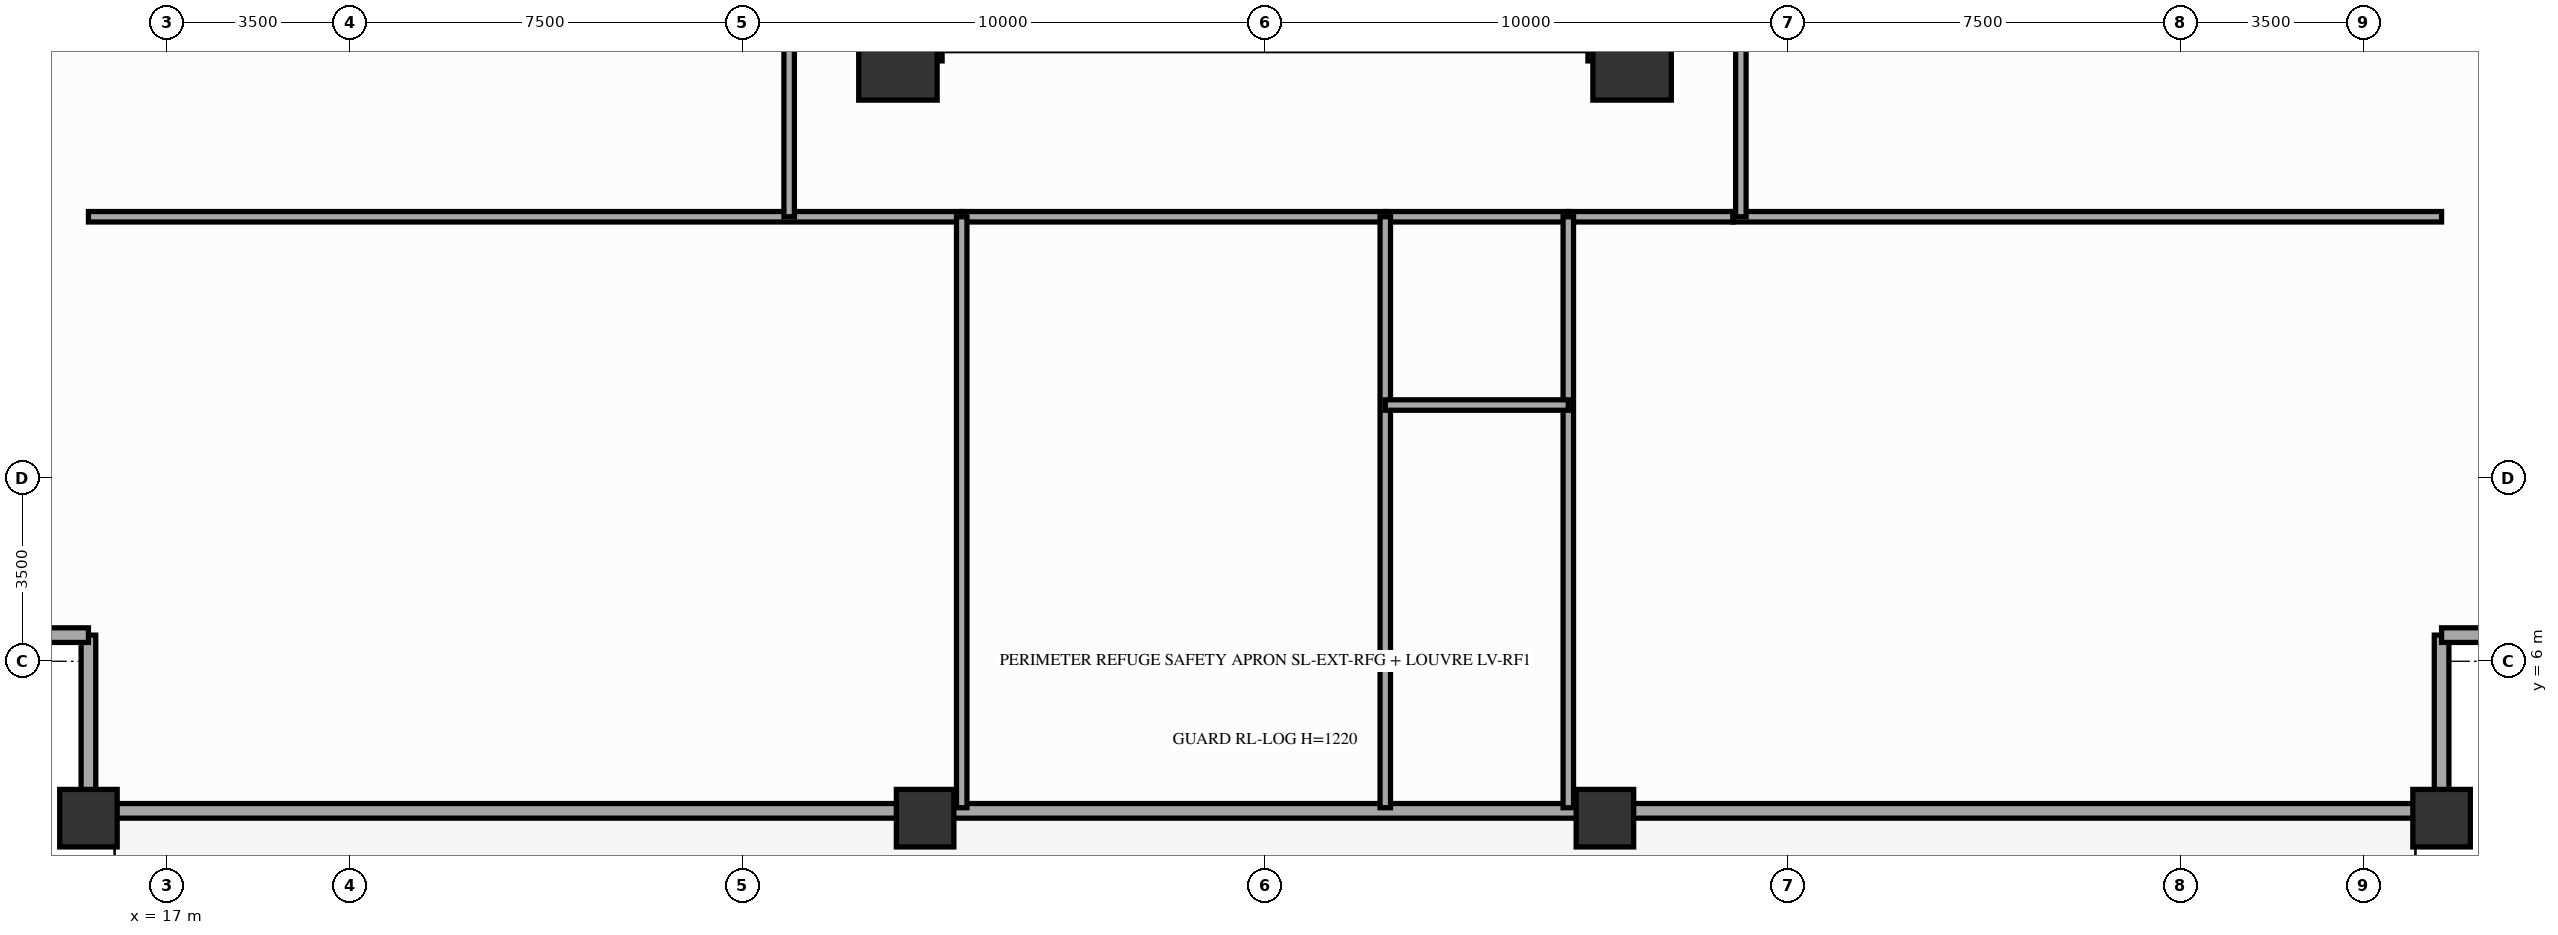
"""IFC4 building model, lengths in metres.
Left out: names, types, materials, properties, quantities, classifications, styles, units other than length and angle.
Written with IfcOpenShell. Run it as: python <this file> out.ifc"""

import sys

from ifc_helpers import new_model, si_unit, direction, frame, frame_2d, origin, origin_2d, place, context, subcontext, project, spatial, rectangle, extrude, source, transform, mapped, element, fill, save


model = new_model("IFC4")
c1 = context("Model", 3, precision=1e-05, world=origin(), true_north=direction((0.0, 1.0)))
c2 = subcontext(c1, "Body", "Model", "MODEL_VIEW")
j1 = project(units=[si_unit("LENGTHUNIT", "METRE"), si_unit("PLANEANGLEUNIT", "RADIAN")], contexts=[c1])
p1 = place(None, origin())
s1 = spatial("IfcSite", under=j1, at=p1, CompositionType="ELEMENT")
p2 = place(p1, origin())
s2 = spatial("IfcBuilding", under=s1, at=p2, CompositionType="ELEMENT")
p3 = place(p2, frame((0.0, 0.0, 70.4)))
s3 = spatial("IfcBuildingStorey", under=s2, at=p3, CompositionType="ELEMENT", Elevation=70.4)
p4 = place(p3, frame((31.5, 17.48, 0.0), z_axis=(0.0, 0.0, 1.0), x_axis=(0.0, 1.0, 0.0)))
e1 = element("IfcWall", 1, at=p4, inside=s3, PredefinedType="SHEAR", context=c2, shape_type="SweptSolid", body=[
    extrude(rectangle(XDim=19.04, YDim=0.65, at=frame_2d((9.52, 0.0))), origin(), (0.0, 0.0, 1.0), 3.95),
])
p5 = place(p4, frame((6.32, 0.0, 0.0)))
e2 = element("IfcOpeningElement", 2, at=p5, cuts=e1, PredefinedType="OPENING", context=c2, shape_type="SweptSolid", body=[
    extrude(rectangle(XDim=1.1, YDim=2.15, at=frame_2d((0.55, 1.075))), frame((0.0, 0.337, 0.0), z_axis=(0.0, -1.0, 0.0), x_axis=(1.0, 0.0, 0.0)), (0.0, 0.0, 1.0), 0.674),
])
p6 = place(p3, frame((44.5, 17.48, 0.0), z_axis=(0.0, 0.0, 1.0), x_axis=(0.0, 1.0, 0.0)))
e3 = element("IfcWall", 3, at=p6, inside=s3, PredefinedType="SHEAR", context=c2, shape_type="SweptSolid", body=[
    extrude(rectangle(XDim=19.04, YDim=0.65, at=frame_2d((9.52, 0.0))), origin(), (0.0, 0.0, 1.0), 3.95),
])
p7 = place(p6, frame((12.67, 0.0, 0.0), z_axis=(0.0, 0.0, 1.0), x_axis=(-1.0, 0.0, 0.0)))
e4 = element("IfcOpeningElement", 4, at=p7, cuts=e3, PredefinedType="OPENING", context=c2, shape_type="SweptSolid", body=[
    extrude(rectangle(XDim=1.1, YDim=2.15, at=frame_2d((0.55, 1.075))), frame((0.0, 0.337, 0.0), z_axis=(0.0, -1.0, 0.0), x_axis=(1.0, 0.0, 0.0)), (0.0, 0.0, 1.0), 0.674),
])
m1 = source(origin(), c2, "Body", "SweptSolid", [
    extrude(rectangle(XDim=1.5, YDim=1.5, at=origin_2d()), origin(), (0.0, 0.0, 1.0), 3.95),
])
for number, where, z_axis, x_axis in (
    (5, (30.98, 17.48, 0.0), (0.0, 0.0, 1.0), (1.0, 0.0, 0.0)),
    (6, (45.02, 17.48, 0.0), (0.0, 0.0, 1.0), (1.0, 0.0, 0.0)),
):
    element("IfcColumn", number, at=place(p3, frame(where, z_axis=z_axis, x_axis=x_axis)), inside=s3, PredefinedType="COLUMN", context=c2, shape_type="MappedRepresentation", body=[
        mapped(m1, transform((0.0, 0.0, 0.0), scale=1.0)),
    ])
m2 = source(origin(), c2, "Body", "SweptSolid", [
    extrude(rectangle(XDim=1.1, YDim=1.1, at=origin_2d()), origin(), (0.0, 0.0, 1.0), 3.95),
])
for number, where, z_axis, x_axis in (
    (7, (15.5, 3.0, 0.0), (0.0, 0.0, 1.0), (1.0, 0.0, 0.0)),
    (8, (31.5, 3.0, 0.0), (0.0, 0.0, 1.0), (1.0, 0.0, 0.0)),
    (9, (44.5, 3.0, 0.0), (0.0, 0.0, 1.0), (1.0, 0.0, 0.0)),
    (10, (60.5, 3.0, 0.0), (0.0, 0.0, 1.0), (1.0, 0.0, 0.0)),
):
    element("IfcColumn", number, at=place(p3, frame(where, z_axis=z_axis, x_axis=x_axis)), inside=s3, PredefinedType="COLUMN", context=c2, shape_type="MappedRepresentation", body=[
        mapped(m2, transform((0.0, 0.0, 0.0), scale=1.0)),
    ])
p8 = place(p3, frame((15.5, 3.14, 0.0), z_axis=(0.0, 0.0, 1.0), x_axis=(1.0, 0.0, 0.0)))
e11 = element("IfcWall", 11, at=p8, inside=s3, PredefinedType="SOLIDWALL", context=c2, shape_type="SweptSolid", body=[
    extrude(rectangle(XDim=45.0, YDim=0.28, at=frame_2d((22.5, 0.0))), origin(), (0.0, 0.0, 1.0), 2.29),
])
p9 = place(p8, frame((18.7, 0.0, 0.45)))
e12 = element("IfcOpeningElement", 12, at=p9, cuts=e11, PredefinedType="OPENING", context=c2, shape_type="SweptSolid", body=[
    extrude(rectangle(XDim=1.2, YDim=0.9, at=frame_2d((0.6, 0.45))), frame((0.0, 0.152, 0.0), z_axis=(0.0, -1.0, 0.0), x_axis=(1.0, 0.0, 0.0)), (0.0, 0.0, 1.0), 0.304),
])
p10 = place(p8, frame((25.7, 0.0, 0.45)))
e13 = element("IfcOpeningElement", 13, at=p10, cuts=e11, PredefinedType="OPENING", context=c2, shape_type="SweptSolid", body=[
    extrude(rectangle(XDim=1.2, YDim=0.9, at=frame_2d((0.6, 0.45))), frame((0.0, 0.152, 0.0), z_axis=(0.0, -1.0, 0.0), x_axis=(1.0, 0.0, 0.0)), (0.0, 0.0, 1.0), 0.304),
])
for number, where, z_axis, x_axis in (
    (14, (15.5, 3.0, 0.0), (0.0, 0.0, 1.0), (0.0, 1.0, 0.0)),
    (15, (12.0, 6.5, 0.0), (0.0, 0.0, 1.0), (1.0, 0.0, 0.0)),
    (16, (60.5, 3.0, 0.0), (0.0, 0.0, 1.0), (0.0, 1.0, 0.0)),
    (17, (60.5, 6.5, 0.0), (0.0, 0.0, 1.0), (1.0, 0.0, 0.0)),
):
    element("IfcWall", number, at=place(p3, frame(where, z_axis=z_axis, x_axis=x_axis)), inside=s3, PredefinedType="SOLIDWALL", context=c2, shape_type="SweptSolid", body=[
        extrude(rectangle(XDim=3.5, YDim=0.28, at=frame_2d((1.75, 0.0))), origin(), (0.0, 0.0, 1.0), 2.29),
    ])
p11 = place(p3, frame((15.5, 14.5, 0.0), z_axis=(0.0, 0.0, 1.0), x_axis=(1.0, 0.0, 0.0)))
e18 = element("IfcWall", 18, at=p11, inside=s3, PredefinedType="PARTITIONING", context=c2, shape_type="SweptSolid", body=[
    extrude(rectangle(XDim=16.7, YDim=0.2, at=frame_2d((8.35, 0.0))), origin(), (0.0, 0.0, 1.0), 3.61),
])
p12 = place(p11, frame((14.0, 0.0, 0.0)))
e19 = element("IfcOpeningElement", 19, at=p12, cuts=e18, PredefinedType="OPENING", context=c2, shape_type="SweptSolid", body=[
    extrude(rectangle(XDim=1.1, YDim=2.15, at=frame_2d((0.55, 1.075))), frame((0.0, 0.112, 0.0), z_axis=(0.0, -1.0, 0.0), x_axis=(1.0, 0.0, 0.0)), (0.0, 0.0, 1.0), 0.224),
])
p13 = place(p3, frame((32.2, 14.5, 0.0), z_axis=(0.0, 0.0, 1.0), x_axis=(1.0, 0.0, 0.0)))
e20 = element("IfcWall", 20, at=p13, inside=s3, PredefinedType="PARTITIONING", context=c2, shape_type="SweptSolid", body=[
    extrude(rectangle(XDim=8.1, YDim=0.2, at=frame_2d((4.05, 0.0))), origin(), (0.0, 0.0, 1.0), 3.61),
])
p14 = place(p13, frame((3.5, 0.0, 0.0)))
e21 = element("IfcOpeningElement", 21, at=p14, cuts=e20, PredefinedType="OPENING", context=c2, shape_type="SweptSolid", body=[
    extrude(rectangle(XDim=1.1, YDim=2.15, at=frame_2d((0.55, 1.075))), frame((0.0, 0.112, 0.0), z_axis=(0.0, -1.0, 0.0), x_axis=(1.0, 0.0, 0.0)), (0.0, 0.0, 1.0), 0.224),
])
p15 = place(p3, frame((40.3, 14.5, 0.0), z_axis=(0.0, 0.0, 1.0), x_axis=(1.0, 0.0, 0.0)))
e22 = element("IfcWall", 22, at=p15, inside=s3, PredefinedType="PARTITIONING", context=c2, shape_type="SweptSolid", body=[
    extrude(rectangle(XDim=3.5, YDim=0.2, at=frame_2d((1.75, 0.0))), origin(), (0.0, 0.0, 1.0), 3.61),
])
p16 = place(p15, frame((1.25, 0.0, 0.0)))
e23 = element("IfcOpeningElement", 23, at=p16, cuts=e22, PredefinedType="OPENING", context=c2, shape_type="SweptSolid", body=[
    extrude(rectangle(XDim=1.0, YDim=2.1, at=frame_2d((0.5, 1.05))), frame((0.0, 0.112, 0.0), z_axis=(0.0, -1.0, 0.0), x_axis=(1.0, 0.0, 0.0)), (0.0, 0.0, 1.0), 0.224),
])
p17 = place(p3, frame((43.8, 14.5, 0.0), z_axis=(0.0, 0.0, 1.0), x_axis=(1.0, 0.0, 0.0)))
e24 = element("IfcWall", 24, at=p17, inside=s3, PredefinedType="PARTITIONING", context=c2, shape_type="SweptSolid", body=[
    extrude(rectangle(XDim=3.15, YDim=0.2, at=frame_2d((1.575, 0.0))), origin(), (0.0, 0.0, 1.0), 3.61),
])
p18 = place(p17, frame((0.928, 0.0, 0.0)))
e25 = element("IfcOpeningElement", 25, at=p18, cuts=e24, PredefinedType="OPENING", context=c2, shape_type="SweptSolid", body=[
    extrude(rectangle(XDim=1.1, YDim=2.15, at=frame_2d((0.55, 1.075))), frame((0.0, 0.112, 0.0), z_axis=(0.0, -1.0, 0.0), x_axis=(1.0, 0.0, 0.0)), (0.0, 0.0, 1.0), 0.224),
])
p19 = place(p3, frame((46.95, 14.5, 0.0), z_axis=(0.0, 0.0, 1.0), x_axis=(1.0, 0.0, 0.0)))
e26 = element("IfcWall", 26, at=p19, inside=s3, PredefinedType="PARTITIONING", context=c2, shape_type="SweptSolid", body=[
    extrude(rectangle(XDim=13.55, YDim=0.2, at=frame_2d((6.775, 0.0))), origin(), (0.0, 0.0, 1.0), 3.61),
])
for number, where, z_axis, x_axis in (
    (27, (32.2, 3.2, 0.0), (0.0, 0.0, 1.0), (0.0, 1.0, 0.0)),
    (28, (40.3, 3.2, 0.0), (0.0, 0.0, 1.0), (0.0, 1.0, 0.0)),
    (29, (43.8, 3.2, 0.0), (0.0, 0.0, 1.0), (0.0, 1.0, 0.0)),
):
    element("IfcWall", number, at=place(p3, frame(where, z_axis=z_axis, x_axis=x_axis)), inside=s3, PredefinedType="PARTITIONING", context=c2, shape_type="SweptSolid", body=[
        extrude(rectangle(XDim=11.3, YDim=0.2, at=frame_2d((5.65, 0.0))), origin(), (0.0, 0.0, 1.0), 3.61),
    ])
p20 = place(p3, frame((40.3, 10.9, 0.0), z_axis=(0.0, 0.0, 1.0), x_axis=(1.0, 0.0, 0.0)))
e30 = element("IfcWall", 30, at=p20, inside=s3, PredefinedType="PARTITIONING", context=c2, shape_type="SweptSolid", body=[
    extrude(rectangle(XDim=3.5, YDim=0.2, at=frame_2d((1.75, 0.0))), origin(), (0.0, 0.0, 1.0), 3.61),
])
p21 = place(p3, frame((28.9, 14.5, 0.0), z_axis=(0.0, 0.0, 1.0), x_axis=(0.0, 1.0, 0.0)))
e31 = element("IfcWall", 31, at=p21, inside=s3, PredefinedType="PARTITIONING", context=c2, shape_type="SweptSolid", body=[
    extrude(rectangle(XDim=24.8, YDim=0.2, at=frame_2d((12.4, 0.0))), origin(), (0.0, 0.0, 1.0), 3.61),
])
p22 = place(p21, frame((11.85, 0.0, 0.0)))
e32 = element("IfcOpeningElement", 32, at=p22, cuts=e31, PredefinedType="OPENING", context=c2, shape_type="SweptSolid", body=[
    extrude(rectangle(XDim=1.1, YDim=2.15, at=frame_2d((0.55, 1.075))), frame((0.0, 0.112, 0.0), z_axis=(0.0, -1.0, 0.0), x_axis=(1.0, 0.0, 0.0)), (0.0, 0.0, 1.0), 0.224),
])
p23 = place(p3, frame((47.1, 14.5, 0.0), z_axis=(0.0, 0.0, 1.0), x_axis=(0.0, 1.0, 0.0)))
e33 = element("IfcWall", 33, at=p23, inside=s3, PredefinedType="PARTITIONING", context=c2, shape_type="SweptSolid", body=[
    extrude(rectangle(XDim=24.8, YDim=0.2, at=frame_2d((12.4, 0.0))), origin(), (0.0, 0.0, 1.0), 3.61),
])
p24 = place(p23, frame((11.85, 0.0, 0.0)))
e34 = element("IfcOpeningElement", 34, at=p24, cuts=e33, PredefinedType="OPENING", context=c2, shape_type="SweptSolid", body=[
    extrude(rectangle(XDim=1.1, YDim=2.15, at=frame_2d((0.55, 1.075))), frame((0.0, 0.112, 0.0), z_axis=(0.0, -1.0, 0.0), x_axis=(1.0, 0.0, 0.0)), (0.0, 0.0, 1.0), 0.224),
])
m3 = source(origin(), c2, "Body", "SweptSolid", [
    extrude(rectangle(XDim=1.2, YDim=0.9, at=frame_2d((0.6, 0.45))), frame((0.0, 0.03, 0.0), z_axis=(0.0, -1.0, 0.0), x_axis=(1.0, 0.0, 0.0)), (0.0, 0.0, 1.0), 0.06),
])
p25 = place(p9, origin())
e35 = element("IfcWindow", 35, at=p25, inside=s3, PartitioningType="SINGLE_PANEL", PredefinedType="WINDOW", context=c2, shape_type="MappedRepresentation", body=[
    mapped(m3, transform((0.0, 0.0, 0.0), scale=1.0)),
])
fill(e12, e35)
p26 = place(p10, origin())
e36 = element("IfcWindow", 36, at=p26, inside=s3, PartitioningType="SINGLE_PANEL", PredefinedType="WINDOW", context=c2, shape_type="MappedRepresentation", body=[
    mapped(m3, transform((0.0, 0.0, 0.0), scale=1.0)),
])
fill(e13, e36)
m4 = source(origin(), c2, "Body", "SweptSolid", [
    extrude(rectangle(XDim=1.1, YDim=2.15, at=frame_2d((0.55, 1.075))), frame((0.0, 0.025, 0.0), z_axis=(0.0, -1.0, 0.0), x_axis=(1.0, 0.0, 0.0)), (0.0, 0.0, 1.0), 0.05),
])
p27 = place(p12, origin())
e37 = element("IfcDoor", 37, at=p27, inside=s3, OperationType="SINGLE_SWING_RIGHT", PredefinedType="DOOR", context=c2, shape_type="MappedRepresentation", body=[
    mapped(m4, transform((0.0, 0.0, 0.0), scale=1.0)),
])
fill(e19, e37)
p28 = place(p14, origin())
e38 = element("IfcDoor", 38, at=p28, inside=s3, OperationType="SINGLE_SWING_LEFT", PredefinedType="DOOR", context=c2, shape_type="MappedRepresentation", body=[
    mapped(m4, transform((0.0, 0.0, 0.0), scale=1.0)),
])
fill(e21, e38)
m5 = source(origin(), c2, "Body", "SweptSolid", [
    extrude(rectangle(XDim=1.0, YDim=2.1, at=frame_2d((0.5, 1.05))), frame((0.0, 0.025, 0.0), z_axis=(0.0, -1.0, 0.0), x_axis=(1.0, 0.0, 0.0)), (0.0, 0.0, 1.0), 0.05),
])
p29 = place(p16, origin())
e39 = element("IfcDoor", 39, at=p29, inside=s3, OperationType="SINGLE_SWING_RIGHT", PredefinedType="DOOR", context=c2, shape_type="MappedRepresentation", body=[
    mapped(m5, transform((0.0, 0.0, 0.0), scale=1.0)),
])
fill(e23, e39)
p30 = place(p18, origin())
e40 = element("IfcDoor", 40, at=p30, inside=s3, OperationType="SINGLE_SWING_LEFT", PredefinedType="DOOR", context=c2, shape_type="MappedRepresentation", body=[
    mapped(m4, transform((0.0, 0.0, 0.0), scale=1.0)),
])
fill(e25, e40)
save(model, sys.argv[1])
